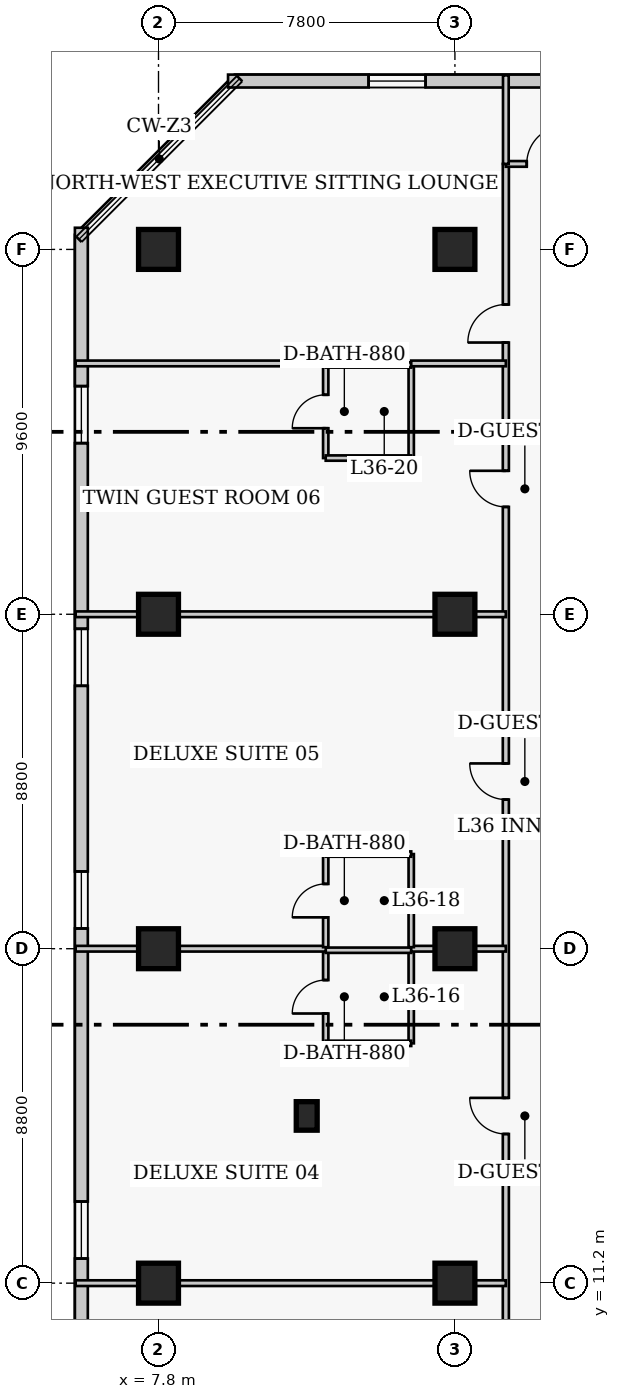
"""IFC4 building model, lengths in metres.
Left out: names, types, materials, properties, quantities, classifications, styles, units other than length and angle.
Written with IfcOpenShell. Run it as: python <this file> out.ifc"""

import sys

from ifc_helpers import new_model, si_unit, direction, frame, frame_2d, origin, origin_2d, place, context, subcontext, project, spatial, rectangle, extrude, element, fill, save


model = new_model("IFC4")
c1 = context("Model", 3, precision=1e-05, world=origin(), true_north=direction((0.0, 1.0)))
c2 = subcontext(c1, "Body", "Model", "MODEL_VIEW")
j1 = project(units=[si_unit("LENGTHUNIT", "METRE"), si_unit("PLANEANGLEUNIT", "RADIAN")], contexts=[c1])
p1 = place(None, origin())
s1 = spatial("IfcSite", under=j1, at=p1, CompositionType="ELEMENT")
p2 = place(p1, origin())
s2 = spatial("IfcBuilding", under=s1, at=p2, CompositionType="ELEMENT")
p3 = place(p2, frame((0.0, 0.0, 146.0)))
s3 = spatial("IfcBuildingStorey", under=s2, at=p3, CompositionType="ELEMENT", Elevation=146.0)
for number, where, z_axis, x_axis in (
    (1, (7.8, 11.2, 0.0), (0.0, 0.0, 1.0), (1.0, 0.0, 0.0)),
    (2, (7.8, 20.0, 0.0), (0.0, 0.0, 1.0), (1.0, 0.0, 0.0)),
    (3, (7.8, 28.8, 0.0), (0.0, 0.0, 1.0), (1.0, 0.0, 0.0)),
    (4, (7.8, 38.4, 0.0), (0.0, 0.0, 1.0), (1.0, 0.0, 0.0)),
    (5, (15.6, 11.2, 0.0), (0.0, 0.0, 1.0), (1.0, 0.0, 0.0)),
    (6, (15.6, 20.0, 0.0), (0.0, 0.0, 1.0), (1.0, 0.0, 0.0)),
    (7, (15.6, 28.8, 0.0), (0.0, 0.0, 1.0), (1.0, 0.0, 0.0)),
    (8, (15.6, 38.4, 0.0), (0.0, 0.0, 1.0), (1.0, 0.0, 0.0)),
):
    element("IfcColumn", number, at=place(p3, frame(where, z_axis=z_axis, x_axis=x_axis)), inside=s3, PredefinedType="COLUMN", context=c2, shape_type="SweptSolid", body=[
        extrude(rectangle(XDim=1.05, YDim=1.05, at=origin_2d()), origin(), (0.0, 0.0, 1.0), 3.8),
    ])
p4 = place(p3, frame((11.7, 15.6, 0.0), z_axis=(0.0, 0.0, 1.0), x_axis=(1.0, 0.0, 0.0)))
e9 = element("IfcColumn", 9, at=p4, inside=s3, PredefinedType="PILASTER", context=c2, shape_type="SweptSolid", body=[
    extrude(rectangle(XDim=0.55, YDim=0.75, at=origin_2d()), origin(), (0.0, 0.0, 1.0), 3.8),
])
p5 = place(p3, frame((36.32, 42.83, 0.0), z_axis=(0.0, 0.0, 1.0), x_axis=(-1.0, 0.0, 0.0)))
e10 = element("IfcWall", 10, at=p5, inside=s3, PredefinedType="SOLIDWALL", context=c2, shape_type="SweptSolid", body=[
    extrude(rectangle(XDim=26.69, YDim=0.34, at=frame_2d((13.345, 0.0))), origin(), (0.0, 0.0, 1.0), 3.55),
])
p6 = place(p5, frame((7.32, 0.0, 0.0)))
e11 = element("IfcOpeningElement", 11, at=p6, cuts=e10, PredefinedType="OPENING", context=c2, shape_type="SweptSolid", body=[
    extrude(rectangle(XDim=1.4, YDim=2.15, at=frame_2d((0.7, 1.075))), frame((0.0, 0.18, 0.0), z_axis=(0.0, -1.0, 0.0), x_axis=(1.0, 0.0, 0.0)), (0.0, 0.0, 1.0), 0.36),
])
p7 = place(p5, frame((2.548, 0.0, 0.85)))
e12 = element("IfcOpeningElement", 12, at=p7, cuts=e10, PredefinedType="OPENING", context=c2, shape_type="SweptSolid", body=[
    extrude(rectangle(XDim=1.5, YDim=1.75, at=frame_2d((0.75, 0.875))), frame((0.0, 0.18, 0.0), z_axis=(0.0, -1.0, 0.0), x_axis=(1.0, 0.0, 0.0)), (0.0, 0.0, 1.0), 0.36),
])
p8 = place(p5, frame((12.595, 0.0, 0.85)))
e13 = element("IfcOpeningElement", 13, at=p8, cuts=e10, PredefinedType="OPENING", context=c2, shape_type="SweptSolid", body=[
    extrude(rectangle(XDim=1.5, YDim=1.75, at=frame_2d((0.75, 0.875))), frame((0.0, 0.18, 0.0), z_axis=(0.0, -1.0, 0.0), x_axis=(1.0, 0.0, 0.0)), (0.0, 0.0, 1.0), 0.36),
])
p9 = place(p5, frame((21.492, 0.0, 0.85)))
e14 = element("IfcOpeningElement", 14, at=p9, cuts=e10, PredefinedType="OPENING", context=c2, shape_type="SweptSolid", body=[
    extrude(rectangle(XDim=1.5, YDim=1.75, at=frame_2d((0.75, 0.875))), frame((0.0, 0.18, 0.0), z_axis=(0.0, -1.0, 0.0), x_axis=(1.0, 0.0, 0.0)), (0.0, 0.0, 1.0), 0.36),
])
p10 = place(p3, frame((5.77, 38.97, 0.0), z_axis=(0.0, 0.0, 1.0), x_axis=(0.0, -1.0, 0.0)))
e15 = element("IfcWall", 15, at=p10, inside=s3, PredefinedType="SOLIDWALL", context=c2, shape_type="SweptSolid", body=[
    extrude(rectangle(XDim=30.14, YDim=0.34, at=frame_2d((15.07, 0.0))), origin(), (0.0, 0.0, 1.0), 3.55),
])
p11 = place(p10, frame((4.167, 0.0, 0.85)))
e16 = element("IfcOpeningElement", 16, at=p11, cuts=e15, PredefinedType="OPENING", context=c2, shape_type="SweptSolid", body=[
    extrude(rectangle(XDim=1.5, YDim=1.75, at=frame_2d((0.75, 0.875))), frame((0.0, 0.18, 0.0), z_axis=(0.0, -1.0, 0.0), x_axis=(1.0, 0.0, 0.0)), (0.0, 0.0, 1.0), 0.36),
])
p12 = place(p10, frame((10.552, 0.0, 0.85)))
e17 = element("IfcOpeningElement", 17, at=p12, cuts=e15, PredefinedType="OPENING", context=c2, shape_type="SweptSolid", body=[
    extrude(rectangle(XDim=1.5, YDim=1.75, at=frame_2d((0.75, 0.875))), frame((0.0, 0.18, 0.0), z_axis=(0.0, -1.0, 0.0), x_axis=(1.0, 0.0, 0.0)), (0.0, 0.0, 1.0), 0.36),
])
p13 = place(p10, frame((16.938, 0.0, 0.85)))
e18 = element("IfcOpeningElement", 18, at=p13, cuts=e15, PredefinedType="OPENING", context=c2, shape_type="SweptSolid", body=[
    extrude(rectangle(XDim=1.5, YDim=1.75, at=frame_2d((0.75, 0.875))), frame((0.0, 0.18, 0.0), z_axis=(0.0, -1.0, 0.0), x_axis=(1.0, 0.0, 0.0)), (0.0, 0.0, 1.0), 0.36),
])
p14 = place(p10, frame((25.623, 0.0, 0.85)))
e19 = element("IfcOpeningElement", 19, at=p14, cuts=e15, PredefinedType="OPENING", context=c2, shape_type="SweptSolid", body=[
    extrude(rectangle(XDim=1.5, YDim=1.75, at=frame_2d((0.75, 0.875))), frame((0.0, 0.18, 0.0), z_axis=(0.0, -1.0, 0.0), x_axis=(1.0, 0.0, 0.0)), (0.0, 0.0, 1.0), 0.36),
])
p15 = place(p3, frame((16.94, 6.85, 0.0), z_axis=(0.0, 0.0, 1.0), x_axis=(0.0, 1.0, 0.0)))
e20 = element("IfcWall", 20, at=p15, inside=s3, PredefinedType="PARTITIONING", context=c2, shape_type="SweptSolid", body=[
    extrude(rectangle(XDim=33.8, YDim=0.16, at=frame_2d((16.9, 0.0))), origin(), (0.0, 0.0, 1.0), 3.55),
])
p16 = place(p15, frame((1.7, 0.0, 0.0)))
e21 = element("IfcOpeningElement", 21, at=p16, cuts=e20, PredefinedType="OPENING", context=c2, shape_type="SweptSolid", body=[
    extrude(rectangle(XDim=0.95, YDim=2.1, at=frame_2d((0.475, 1.05))), frame((0.0, 0.09, 0.0), z_axis=(0.0, -1.0, 0.0), x_axis=(1.0, 0.0, 0.0)), (0.0, 0.0, 1.0), 0.18),
])
p17 = place(p15, frame((8.275, 0.0, 0.0)))
e22 = element("IfcOpeningElement", 22, at=p17, cuts=e20, PredefinedType="OPENING", context=c2, shape_type="SweptSolid", body=[
    extrude(rectangle(XDim=0.95, YDim=2.1, at=frame_2d((0.475, 1.05))), frame((0.0, 0.09, 0.0), z_axis=(0.0, -1.0, 0.0), x_axis=(1.0, 0.0, 0.0)), (0.0, 0.0, 1.0), 0.18),
])
p18 = place(p15, frame((17.075, 0.0, 0.0)))
e23 = element("IfcOpeningElement", 23, at=p18, cuts=e20, PredefinedType="OPENING", context=c2, shape_type="SweptSolid", body=[
    extrude(rectangle(XDim=0.95, YDim=2.1, at=frame_2d((0.475, 1.05))), frame((0.0, 0.09, 0.0), z_axis=(0.0, -1.0, 0.0), x_axis=(1.0, 0.0, 0.0)), (0.0, 0.0, 1.0), 0.18),
])
p19 = place(p15, frame((24.775, 0.0, 0.0)))
e24 = element("IfcOpeningElement", 24, at=p19, cuts=e20, PredefinedType="OPENING", context=c2, shape_type="SweptSolid", body=[
    extrude(rectangle(XDim=0.95, YDim=2.1, at=frame_2d((0.475, 1.05))), frame((0.0, 0.09, 0.0), z_axis=(0.0, -1.0, 0.0), x_axis=(1.0, 0.0, 0.0)), (0.0, 0.0, 1.0), 0.18),
])
p20 = place(p15, frame((29.1, 0.0, 0.0)))
e25 = element("IfcOpeningElement", 25, at=p20, cuts=e20, PredefinedType="OPENING", context=c2, shape_type="SweptSolid", body=[
    extrude(rectangle(XDim=1.0, YDim=2.15, at=frame_2d((0.5, 1.075))), frame((0.0, 0.09, 0.0), z_axis=(0.0, -1.0, 0.0), x_axis=(1.0, 0.0, 0.0)), (0.0, 0.0, 1.0), 0.18),
])
p21 = place(p3, frame((16.94, 40.65, 0.0), z_axis=(0.0, 0.0, 1.0), x_axis=(1.0, 0.0, 0.0)))
e26 = element("IfcWall", 26, at=p21, inside=s3, PredefinedType="PARTITIONING", context=c2, shape_type="SweptSolid", body=[
    extrude(rectangle(XDim=5.16, YDim=0.15, at=frame_2d((2.58, 0.0))), origin(), (0.0, 0.0, 1.0), 3.55),
])
p22 = place(p21, frame((0.55, 0.0, 0.0)))
e27 = element("IfcOpeningElement", 27, at=p22, cuts=e26, PredefinedType="OPENING", context=c2, shape_type="SweptSolid", body=[
    extrude(rectangle(XDim=1.0, YDim=2.15, at=frame_2d((0.5, 1.075))), frame((0.0, 0.085, 0.0), z_axis=(0.0, -1.0, 0.0), x_axis=(1.0, 0.0, 0.0)), (0.0, 0.0, 1.0), 0.17),
])
p23 = place(p3, frame((16.94, 40.65, 0.0), z_axis=(0.0, 0.0, 1.0), x_axis=(0.0, 1.0, 0.0)))
e28 = element("IfcWall", 28, at=p23, inside=s3, PredefinedType="PARTITIONING", context=c2, shape_type="SweptSolid", body=[
    extrude(rectangle(XDim=2.33, YDim=0.15, at=frame_2d((1.165, 0.0))), origin(), (0.0, 0.0, 1.0), 3.55),
])
p24 = place(p3, frame((5.62, 11.2, 0.0), z_axis=(0.0, 0.0, 1.0), x_axis=(1.0, 0.0, 0.0)))
e29 = element("IfcWall", 29, at=p24, inside=s3, PredefinedType="PARTITIONING", context=c2, shape_type="SweptSolid", body=[
    extrude(rectangle(XDim=11.32, YDim=0.15, at=frame_2d((5.66, 0.0))), origin(), (0.0, 0.0, 1.0), 2.778),
])
p25 = place(p3, frame((12.2, 17.51, 0.0), z_axis=(0.0, 0.0, 1.0), x_axis=(0.0, 1.0, 0.0)))
e30 = element("IfcWall", 30, at=p25, inside=s3, PredefinedType="PLUMBINGWALL", context=c2, shape_type="SweptSolid", body=[
    extrude(rectangle(XDim=2.45, YDim=0.14, at=frame_2d((1.225, 0.0))), origin(), (0.0, 0.0, 1.0), 3.55),
])
p26 = place(p25, frame((0.785, 0.0, 0.0)))
e31 = element("IfcOpeningElement", 31, at=p26, cuts=e30, PredefinedType="OPENING", context=c2, shape_type="SweptSolid", body=[
    extrude(rectangle(XDim=0.88, YDim=2.05, at=frame_2d((0.44, 1.025))), frame((0.0, 0.08, 0.0), z_axis=(0.0, -1.0, 0.0), x_axis=(1.0, 0.0, 0.0)), (0.0, 0.0, 1.0), 0.16),
])
p27 = place(p3, frame((14.45, 17.51, 0.0), z_axis=(0.0, 0.0, 1.0), x_axis=(0.0, 1.0, 0.0)))
e32 = element("IfcWall", 32, at=p27, inside=s3, PredefinedType="PLUMBINGWALL", context=c2, shape_type="SweptSolid", body=[
    extrude(rectangle(XDim=2.45, YDim=0.14, at=frame_2d((1.225, 0.0))), origin(), (0.0, 0.0, 1.0), 3.55),
])
p28 = place(p3, frame((12.2, 17.51, 0.0), z_axis=(0.0, 0.0, 1.0), x_axis=(1.0, 0.0, 0.0)))
e33 = element("IfcWall", 33, at=p28, inside=s3, PredefinedType="PLUMBINGWALL", context=c2, shape_type="SweptSolid", body=[
    extrude(rectangle(XDim=2.25, YDim=0.14, at=frame_2d((1.125, 0.0))), origin(), (0.0, 0.0, 1.0), 3.55),
])
p29 = place(p3, frame((12.2, 19.96, 0.0), z_axis=(0.0, 0.0, 1.0), x_axis=(1.0, 0.0, 0.0)))
e34 = element("IfcWall", 34, at=p29, inside=s3, PredefinedType="PLUMBINGWALL", context=c2, shape_type="SweptSolid", body=[
    extrude(rectangle(XDim=2.25, YDim=0.14, at=frame_2d((1.125, 0.0))), origin(), (0.0, 0.0, 1.0), 2.9),
])
p30 = place(p3, frame((5.62, 20.0, 0.0), z_axis=(0.0, 0.0, 1.0), x_axis=(1.0, 0.0, 0.0)))
e35 = element("IfcWall", 35, at=p30, inside=s3, PredefinedType="PARTITIONING", context=c2, shape_type="SweptSolid", body=[
    extrude(rectangle(XDim=6.58, YDim=0.15, at=frame_2d((3.29, 0.0))), origin(), (0.0, 0.0, 1.0), 2.778),
])
p31 = place(p3, frame((14.45, 20.0, 0.0), z_axis=(0.0, 0.0, 1.0), x_axis=(1.0, 0.0, 0.0)))
e36 = element("IfcWall", 36, at=p31, inside=s3, PredefinedType="PARTITIONING", context=c2, shape_type="SweptSolid", body=[
    extrude(rectangle(XDim=2.49, YDim=0.15, at=frame_2d((1.245, 0.0))), origin(), (0.0, 0.0, 1.0), 2.778),
])
p32 = place(p3, frame((12.2, 20.04, 0.0), z_axis=(0.0, 0.0, 1.0), x_axis=(0.0, 1.0, 0.0)))
e37 = element("IfcWall", 37, at=p32, inside=s3, PredefinedType="PLUMBINGWALL", context=c2, shape_type="SweptSolid", body=[
    extrude(rectangle(XDim=2.45, YDim=0.14, at=frame_2d((1.225, 0.0))), origin(), (0.0, 0.0, 1.0), 3.55),
])
p33 = place(p32, frame((0.785, 0.0, 0.0)))
e38 = element("IfcOpeningElement", 38, at=p33, cuts=e37, PredefinedType="OPENING", context=c2, shape_type="SweptSolid", body=[
    extrude(rectangle(XDim=0.88, YDim=2.05, at=frame_2d((0.44, 1.025))), frame((0.0, 0.08, 0.0), z_axis=(0.0, -1.0, 0.0), x_axis=(1.0, 0.0, 0.0)), (0.0, 0.0, 1.0), 0.16),
])
p34 = place(p3, frame((14.45, 20.04, 0.0), z_axis=(0.0, 0.0, 1.0), x_axis=(0.0, 1.0, 0.0)))
e39 = element("IfcWall", 39, at=p34, inside=s3, PredefinedType="PLUMBINGWALL", context=c2, shape_type="SweptSolid", body=[
    extrude(rectangle(XDim=2.45, YDim=0.14, at=frame_2d((1.225, 0.0))), origin(), (0.0, 0.0, 1.0), 3.55),
])
p35 = place(p3, frame((12.2, 22.49, 0.0), z_axis=(0.0, 0.0, 1.0), x_axis=(1.0, 0.0, 0.0)))
e40 = element("IfcWall", 40, at=p35, inside=s3, PredefinedType="PLUMBINGWALL", context=c2, shape_type="SweptSolid", body=[
    extrude(rectangle(XDim=2.25, YDim=0.14, at=frame_2d((1.125, 0.0))), origin(), (0.0, 0.0, 1.0), 3.55),
])
p36 = place(p3, frame((5.62, 28.8, 0.0), z_axis=(0.0, 0.0, 1.0), x_axis=(1.0, 0.0, 0.0)))
e41 = element("IfcWall", 41, at=p36, inside=s3, PredefinedType="PARTITIONING", context=c2, shape_type="SweptSolid", body=[
    extrude(rectangle(XDim=11.32, YDim=0.15, at=frame_2d((5.66, 0.0))), origin(), (0.0, 0.0, 1.0), 2.778),
])
p37 = place(p3, frame((12.2, 32.91, 0.0), z_axis=(0.0, 0.0, 1.0), x_axis=(0.0, 1.0, 0.0)))
e42 = element("IfcWall", 42, at=p37, inside=s3, PredefinedType="PLUMBINGWALL", context=c2, shape_type="SweptSolid", body=[
    extrude(rectangle(XDim=2.45, YDim=0.14, at=frame_2d((1.225, 0.0))), origin(), (0.0, 0.0, 1.0), 3.55),
])
p38 = place(p37, frame((0.785, 0.0, 0.0)))
e43 = element("IfcOpeningElement", 43, at=p38, cuts=e42, PredefinedType="OPENING", context=c2, shape_type="SweptSolid", body=[
    extrude(rectangle(XDim=0.88, YDim=2.05, at=frame_2d((0.44, 1.025))), frame((0.0, 0.08, 0.0), z_axis=(0.0, -1.0, 0.0), x_axis=(1.0, 0.0, 0.0)), (0.0, 0.0, 1.0), 0.16),
])
p39 = place(p3, frame((14.45, 32.91, 0.0), z_axis=(0.0, 0.0, 1.0), x_axis=(0.0, 1.0, 0.0)))
e44 = element("IfcWall", 44, at=p39, inside=s3, PredefinedType="PLUMBINGWALL", context=c2, shape_type="SweptSolid", body=[
    extrude(rectangle(XDim=2.45, YDim=0.14, at=frame_2d((1.225, 0.0))), origin(), (0.0, 0.0, 1.0), 3.55),
])
for number, where, z_axis, x_axis in (
    (45, (12.2, 32.91, 0.0), (0.0, 0.0, 1.0), (1.0, 0.0, 0.0)),
    (46, (12.2, 35.36, 0.0), (0.0, 0.0, 1.0), (1.0, 0.0, 0.0)),
):
    element("IfcWall", number, at=place(p3, frame(where, z_axis=z_axis, x_axis=x_axis)), inside=s3, PredefinedType="PLUMBINGWALL", context=c2, shape_type="SweptSolid", body=[
        extrude(rectangle(XDim=2.25, YDim=0.14, at=frame_2d((1.125, 0.0))), origin(), (0.0, 0.0, 1.0), 3.55),
    ])
p40 = place(p3, frame((5.62, 35.4, 0.0), z_axis=(0.0, 0.0, 1.0), x_axis=(1.0, 0.0, 0.0)))
e47 = element("IfcWall", 47, at=p40, inside=s3, PredefinedType="PARTITIONING", context=c2, shape_type="SweptSolid", body=[
    extrude(rectangle(XDim=6.58, YDim=0.15, at=frame_2d((3.29, 0.0))), origin(), (0.0, 0.0, 1.0), 3.55),
])
p41 = place(p3, frame((14.45, 35.4, 0.0), z_axis=(0.0, 0.0, 1.0), x_axis=(1.0, 0.0, 0.0)))
e48 = element("IfcWall", 48, at=p41, inside=s3, PredefinedType="PARTITIONING", context=c2, shape_type="SweptSolid", body=[
    extrude(rectangle(XDim=2.49, YDim=0.15, at=frame_2d((1.245, 0.0))), origin(), (0.0, 0.0, 1.0), 3.55),
])
p42 = place(p9, origin())
e49 = element("IfcWindow", 49, at=p42, inside=s3, PartitioningType="SINGLE_PANEL", PredefinedType="WINDOW", context=c2, shape_type="SweptSolid", body=[
    extrude(rectangle(XDim=1.5, YDim=1.75, at=frame_2d((0.75, 0.875))), frame((0.0, 0.03, 0.0), z_axis=(0.0, -1.0, 0.0), x_axis=(1.0, 0.0, 0.0)), (0.0, 0.0, 1.0), 0.06),
])
fill(e14, e49)
p43 = place(p11, origin())
e50 = element("IfcWindow", 50, at=p43, inside=s3, PartitioningType="SINGLE_PANEL", PredefinedType="WINDOW", context=c2, shape_type="SweptSolid", body=[
    extrude(rectangle(XDim=1.5, YDim=1.75, at=frame_2d((0.75, 0.875))), frame((0.0, 0.03, 0.0), z_axis=(0.0, -1.0, 0.0), x_axis=(1.0, 0.0, 0.0)), (0.0, 0.0, 1.0), 0.06),
])
fill(e16, e50)
p44 = place(p12, origin())
e51 = element("IfcWindow", 51, at=p44, inside=s3, PartitioningType="SINGLE_PANEL", PredefinedType="WINDOW", context=c2, shape_type="SweptSolid", body=[
    extrude(rectangle(XDim=1.5, YDim=1.75, at=frame_2d((0.75, 0.875))), frame((0.0, 0.03, 0.0), z_axis=(0.0, -1.0, 0.0), x_axis=(1.0, 0.0, 0.0)), (0.0, 0.0, 1.0), 0.06),
])
fill(e17, e51)
p45 = place(p13, origin())
e52 = element("IfcWindow", 52, at=p45, inside=s3, PartitioningType="SINGLE_PANEL", PredefinedType="WINDOW", context=c2, shape_type="SweptSolid", body=[
    extrude(rectangle(XDim=1.5, YDim=1.75, at=frame_2d((0.75, 0.875))), frame((0.0, 0.03, 0.0), z_axis=(0.0, -1.0, 0.0), x_axis=(1.0, 0.0, 0.0)), (0.0, 0.0, 1.0), 0.06),
])
fill(e18, e52)
p46 = place(p14, origin())
e53 = element("IfcWindow", 53, at=p46, inside=s3, PartitioningType="SINGLE_PANEL", PredefinedType="WINDOW", context=c2, shape_type="SweptSolid", body=[
    extrude(rectangle(XDim=1.5, YDim=1.75, at=frame_2d((0.75, 0.875))), frame((0.0, 0.03, 0.0), z_axis=(0.0, -1.0, 0.0), x_axis=(1.0, 0.0, 0.0)), (0.0, 0.0, 1.0), 0.06),
])
fill(e19, e53)
p47 = place(p22, origin())
e54 = element("IfcDoor", 54, at=p47, inside=s3, OperationType="SINGLE_SWING_RIGHT", PredefinedType="DOOR", context=c2, shape_type="SweptSolid", body=[
    extrude(rectangle(XDim=1.0, YDim=2.15, at=frame_2d((0.5, 1.075))), frame((0.0, 0.025, 0.0), z_axis=(0.0, -1.0, 0.0), x_axis=(1.0, 0.0, 0.0)), (0.0, 0.0, 1.0), 0.05),
])
fill(e27, e54)
p48 = place(p26, origin())
e55 = element("IfcDoor", 55, at=p48, inside=s3, OperationType="SINGLE_SWING_LEFT", PredefinedType="DOOR", context=c2, shape_type="SweptSolid", body=[
    extrude(rectangle(XDim=0.88, YDim=2.05, at=frame_2d((0.44, 1.025))), frame((0.0, 0.025, 0.0), z_axis=(0.0, -1.0, 0.0), x_axis=(1.0, 0.0, 0.0)), (0.0, 0.0, 1.0), 0.05),
])
fill(e31, e55)
p49 = place(p17, origin())
e56 = element("IfcDoor", 56, at=p49, inside=s3, OperationType="SINGLE_SWING_RIGHT", PredefinedType="DOOR", context=c2, shape_type="SweptSolid", body=[
    extrude(rectangle(XDim=0.95, YDim=2.1, at=frame_2d((0.475, 1.05))), frame((0.0, 0.025, 0.0), z_axis=(0.0, -1.0, 0.0), x_axis=(1.0, 0.0, 0.0)), (0.0, 0.0, 1.0), 0.05),
])
fill(e22, e56)
p50 = place(p33, origin())
e57 = element("IfcDoor", 57, at=p50, inside=s3, OperationType="SINGLE_SWING_LEFT", PredefinedType="DOOR", context=c2, shape_type="SweptSolid", body=[
    extrude(rectangle(XDim=0.88, YDim=2.05, at=frame_2d((0.44, 1.025))), frame((0.0, 0.025, 0.0), z_axis=(0.0, -1.0, 0.0), x_axis=(1.0, 0.0, 0.0)), (0.0, 0.0, 1.0), 0.05),
])
fill(e38, e57)
p51 = place(p18, origin())
e58 = element("IfcDoor", 58, at=p51, inside=s3, OperationType="SINGLE_SWING_RIGHT", PredefinedType="DOOR", context=c2, shape_type="SweptSolid", body=[
    extrude(rectangle(XDim=0.95, YDim=2.1, at=frame_2d((0.475, 1.05))), frame((0.0, 0.025, 0.0), z_axis=(0.0, -1.0, 0.0), x_axis=(1.0, 0.0, 0.0)), (0.0, 0.0, 1.0), 0.05),
])
fill(e23, e58)
p52 = place(p38, origin())
e59 = element("IfcDoor", 59, at=p52, inside=s3, OperationType="SINGLE_SWING_LEFT", PredefinedType="DOOR", context=c2, shape_type="SweptSolid", body=[
    extrude(rectangle(XDim=0.88, YDim=2.05, at=frame_2d((0.44, 1.025))), frame((0.0, 0.025, 0.0), z_axis=(0.0, -1.0, 0.0), x_axis=(1.0, 0.0, 0.0)), (0.0, 0.0, 1.0), 0.05),
])
fill(e43, e59)
p53 = place(p19, origin())
e60 = element("IfcDoor", 60, at=p53, inside=s3, OperationType="SINGLE_SWING_RIGHT", PredefinedType="DOOR", context=c2, shape_type="SweptSolid", body=[
    extrude(rectangle(XDim=0.95, YDim=2.1, at=frame_2d((0.475, 1.05))), frame((0.0, 0.025, 0.0), z_axis=(0.0, -1.0, 0.0), x_axis=(1.0, 0.0, 0.0)), (0.0, 0.0, 1.0), 0.05),
])
fill(e24, e60)
p54 = place(p20, origin())
e61 = element("IfcDoor", 61, at=p54, inside=s3, OperationType="SINGLE_SWING_LEFT", PredefinedType="DOOR", context=c2, shape_type="SweptSolid", body=[
    extrude(rectangle(XDim=1.0, YDim=2.15, at=frame_2d((0.5, 1.075))), frame((0.0, 0.025, 0.0), z_axis=(0.0, -1.0, 0.0), x_axis=(1.0, 0.0, 0.0)), (0.0, 0.0, 1.0), 0.05),
])
fill(e25, e61)
save(model, sys.argv[1])
